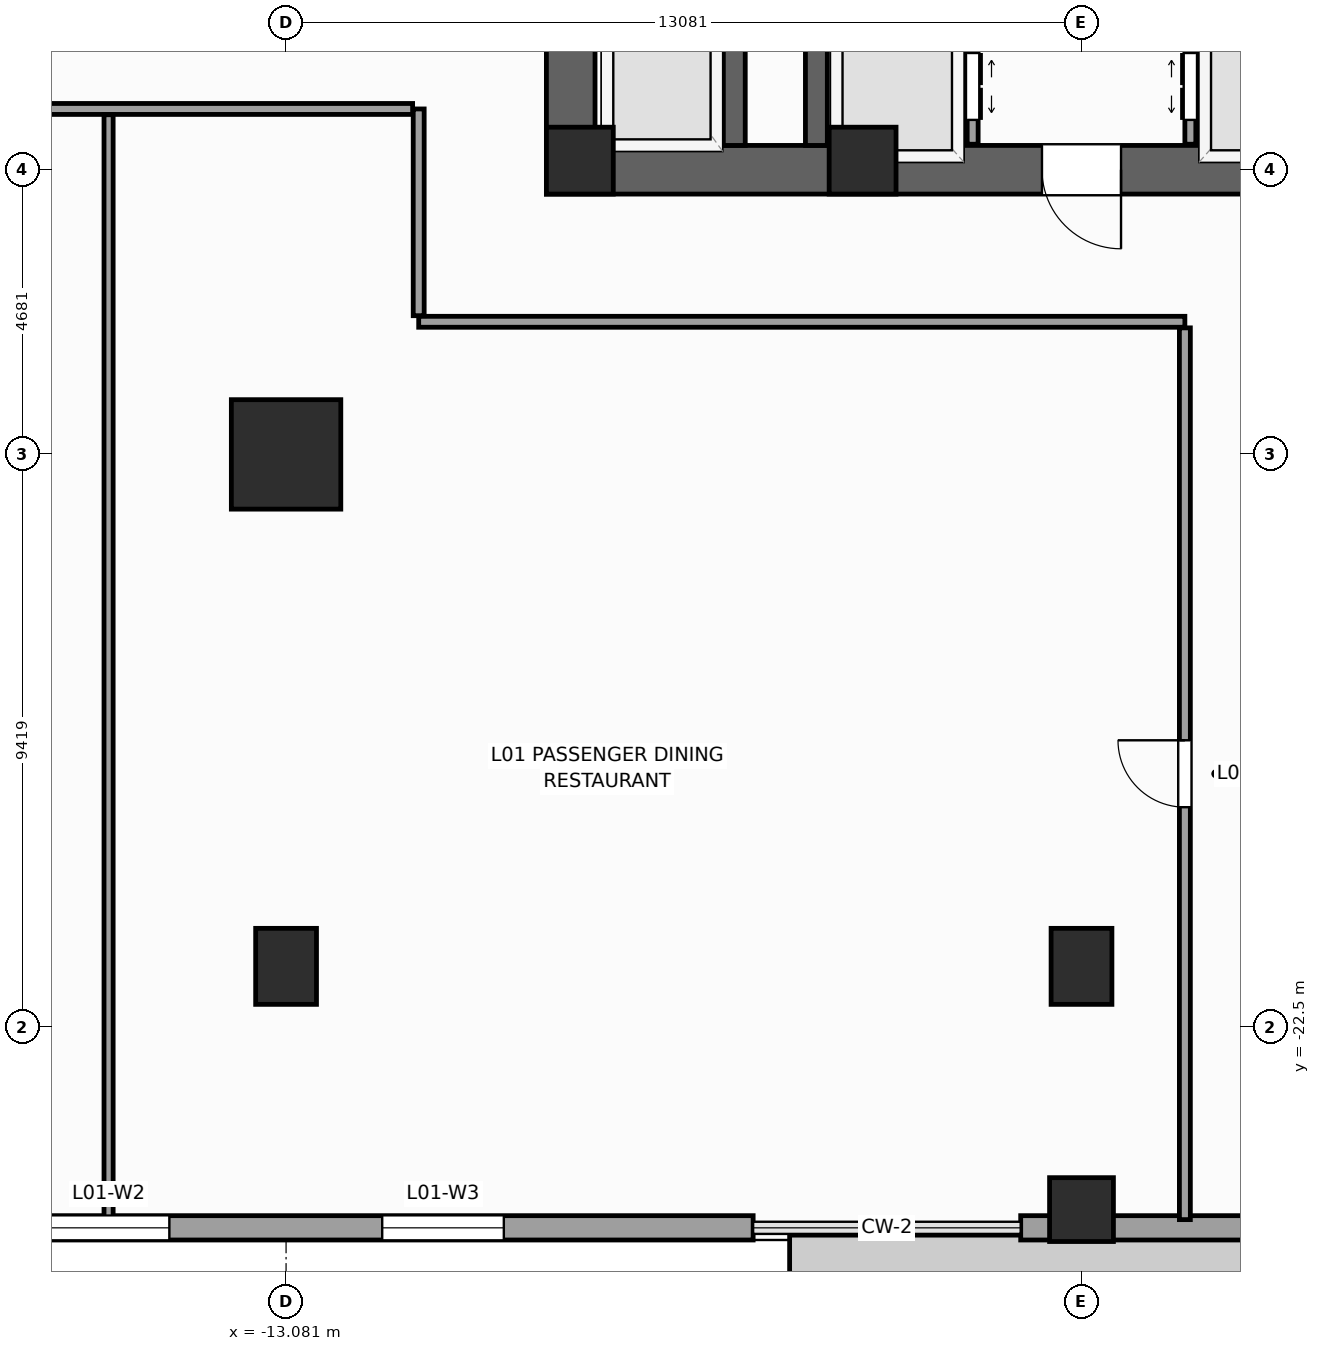
"""IFC4 building model, lengths in metres.
Left out: names, types, materials, properties, quantities, classifications, styles, units other than length and angle.
Written with IfcOpenShell. Run it as: python <this file> out.ifc"""

import sys

from ifc_helpers import new_model, si_unit, direction, frame, frame_2d, origin, origin_2d, place, context, subcontext, project, spatial, rectangle, extrude, source, transform, mapped, element, fill, save


model = new_model("IFC4")
c1 = context("Model", 3, precision=1e-05, world=origin(), true_north=direction((0.0, 1.0)))
c2 = subcontext(c1, "Body", "Model", "MODEL_VIEW")
j1 = project(units=[si_unit("LENGTHUNIT", "METRE"), si_unit("PLANEANGLEUNIT", "RADIAN")], contexts=[c1])
p1 = place(None, origin())
s1 = spatial("IfcSite", under=j1, at=p1, CompositionType="ELEMENT")
p2 = place(p1, origin())
s2 = spatial("IfcBuilding", under=s1, at=p2, CompositionType="ELEMENT")
p3 = place(p2, frame((0.0, 0.0, 6.0)))
s3 = spatial("IfcBuildingStorey", under=s2, at=p3, CompositionType="ELEMENT", Elevation=6.0)
p4 = place(p3, frame((-8.8, -8.4, 0.0), z_axis=(0.0, 0.0, 1.0), x_axis=(1.0, 0.0, 0.0)))
e1 = element("IfcWall", 1, at=p4, inside=s3, PredefinedType="SHEAR", context=c2, shape_type="SweptSolid", body=[
    extrude(rectangle(XDim=17.6, YDim=0.8, at=frame_2d((8.8, 0.0))), origin(), (0.0, 0.0, 1.0), 5.0),
])
p5 = place(p4, frame((8.15, 0.0, 0.0)))
e2 = element("IfcOpeningElement", 2, at=p5, cuts=e1, PredefinedType="OPENING", context=c2, shape_type="SweptSolid", body=[
    extrude(rectangle(XDim=1.3, YDim=2.2, at=frame_2d((0.65, 1.1))), frame((0.0, 0.41, 0.0), z_axis=(0.0, -1.0, 0.0), x_axis=(1.0, 0.0, 0.0)), (0.0, 0.0, 1.0), 0.82),
])
p6 = place(p3, frame((-8.4, -8.0, 0.0), z_axis=(0.0, 0.0, 1.0), x_axis=(0.0, 1.0, 0.0)))
e3 = element("IfcWall", 3, at=p6, inside=s3, PredefinedType="SHEAR", context=c2, shape_type="SweptSolid", body=[
    extrude(rectangle(XDim=16.0, YDim=0.8, at=frame_2d((8.0, 0.0))), origin(), (0.0, 0.0, 1.0), 5.0),
])
p7 = place(p6, frame((4.69, 0.0, 0.0)))
e4 = element("IfcOpeningElement", 4, at=p7, cuts=e3, PredefinedType="OPENING", context=c2, shape_type="SweptSolid", body=[
    extrude(rectangle(XDim=1.3, YDim=2.2, at=frame_2d((0.65, 1.1))), frame((0.0, 0.41, 0.0), z_axis=(0.0, -1.0, 0.0), x_axis=(1.0, 0.0, 0.0)), (0.0, 0.0, 1.0), 0.82),
])
p8 = place(p3, frame((-4.36, -8.0, 0.0), z_axis=(0.0, 0.0, 1.0), x_axis=(0.0, 1.0, 0.0)))
e5 = element("IfcWall", 5, at=p8, inside=s3, PredefinedType="SHEAR", context=c2, shape_type="SweptSolid", body=[
    extrude(rectangle(XDim=16.0, YDim=0.36, at=frame_2d((8.0, 0.0))), origin(), (0.0, 0.0, 1.0), 5.0),
])
p9 = place(p3, frame((-5.71, -8.0, 0.0), z_axis=(0.0, 0.0, 1.0), x_axis=(0.0, 1.0, 0.0)))
e6 = element("IfcWall", 6, at=p9, inside=s3, PredefinedType="SHEAR", context=c2, shape_type="SweptSolid", body=[
    extrude(rectangle(XDim=2.54, YDim=0.36, at=frame_2d((1.27, 0.0))), origin(), (0.0, 0.0, 1.0), 5.0),
])
m1 = source(origin(), c2, "Body", "SweptSolid", [
    extrude(rectangle(XDim=1.1, YDim=1.1, at=origin_2d()), origin(), (0.0, 0.0, 1.0), 5.0),
])
for number, where, z_axis, x_axis in (
    (7, (-8.25, -8.25, 0.0), (0.0, 0.0, 1.0), (1.0, 0.0, 0.0)),
    (8, (-3.6, -8.25, 0.0), (0.0, 0.0, 1.0), (1.0, 0.0, 0.0)),
):
    element("IfcColumn", number, at=place(p3, frame(where, z_axis=z_axis, x_axis=x_axis)), inside=s3, PredefinedType="PILASTER", context=c2, shape_type="MappedRepresentation", body=[
        mapped(m1, transform((0.0, 0.0, 0.0), scale=1.0)),
    ])
m2 = source(origin(), c2, "Body", "SweptSolid", [
    extrude(rectangle(XDim=1.8, YDim=1.8, at=origin_2d()), origin(), (0.0, 0.0, 1.0), 5.0),
])
p10 = place(p3, frame((-13.081, -13.081, 0.0), z_axis=(0.0, 0.0, 1.0), x_axis=(1.0, 0.0, 0.0)))
e9 = element("IfcColumn", 9, at=p10, inside=s3, PredefinedType="COLUMN", context=c2, shape_type="MappedRepresentation", body=[
    mapped(m2, transform((0.0, 0.0, 0.0), scale=1.0)),
])
m3 = source(origin(), c2, "Body", "SweptSolid", [
    extrude(rectangle(XDim=1.0, YDim=1.25, at=origin_2d()), origin(), (0.0, 0.0, 1.0), 5.0),
])
for number, where, z_axis, x_axis in (
    (10, (-13.081, -21.5, 0.0), (0.0, 0.0, 1.0), (1.0, 0.0, 0.0)),
    (11, (0.0, -21.5, 0.0), (0.0, 0.0, 1.0), (1.0, 0.0, 0.0)),
):
    element("IfcColumn", number, at=place(p3, frame(where, z_axis=z_axis, x_axis=x_axis)), inside=s3, PredefinedType="COLUMN", context=c2, shape_type="MappedRepresentation", body=[
        mapped(m3, transform((0.0, 0.0, 0.0), scale=1.0)),
    ])
m4 = source(origin(), c2, "Body", "SweptSolid", [
    extrude(rectangle(XDim=1.05, YDim=1.05, at=origin_2d()), origin(), (0.0, 0.0, 1.0), 5.0),
])
p11 = place(p3, frame((0.0, -25.5, 0.0), z_axis=(0.0, 0.0, 1.0), x_axis=(1.0, 0.0, 0.0)))
e12 = element("IfcColumn", 12, at=p11, inside=s3, PredefinedType="COLUMN", context=c2, shape_type="MappedRepresentation", body=[
    mapped(m4, transform((0.0, 0.0, 0.0), scale=1.0)),
])
p12 = place(p3, frame((-39.0, -25.8, 0.0), z_axis=(0.0, 0.0, 1.0), x_axis=(1.0, 0.0, 0.0)))
e13 = element("IfcWall", 13, at=p12, inside=s3, PredefinedType="STANDARD", context=c2, shape_type="SweptSolid", body=[
    extrude(rectangle(XDim=33.6, YDim=0.4, at=frame_2d((16.8, 0.0))), origin(), (0.0, 0.0, 1.0), 3.85),
])
p13 = place(p12, frame((17.0, 0.0, 0.85)))
e14 = element("IfcOpeningElement", 14, at=p13, cuts=e13, PredefinedType="OPENING", context=c2, shape_type="SweptSolid", body=[
    extrude(rectangle(XDim=2.0, YDim=2.8, at=frame_2d((1.0, 1.4))), frame((0.0, 0.21, 0.0), z_axis=(0.0, -1.0, 0.0), x_axis=(1.0, 0.0, 0.0)), (0.0, 0.0, 1.0), 0.42),
])
p14 = place(p12, frame((22.0, 0.0, 0.85)))
e15 = element("IfcOpeningElement", 15, at=p14, cuts=e13, PredefinedType="OPENING", context=c2, shape_type="SweptSolid", body=[
    extrude(rectangle(XDim=2.0, YDim=2.8, at=frame_2d((1.0, 1.4))), frame((0.0, 0.21, 0.0), z_axis=(0.0, -1.0, 0.0), x_axis=(1.0, 0.0, 0.0)), (0.0, 0.0, 1.0), 0.42),
])
p15 = place(p12, frame((27.5, 0.0, 0.85)))
e16 = element("IfcOpeningElement", 16, at=p15, cuts=e13, PredefinedType="OPENING", context=c2, shape_type="SweptSolid", body=[
    extrude(rectangle(XDim=2.0, YDim=2.8, at=frame_2d((1.0, 1.4))), frame((0.0, 0.21, 0.0), z_axis=(0.0, -1.0, 0.0), x_axis=(1.0, 0.0, 0.0)), (0.0, 0.0, 1.0), 0.42),
])
p16 = place(p3, frame((-1.0, -25.8, 0.0), z_axis=(0.0, 0.0, 1.0), x_axis=(1.0, 0.0, 0.0)))
e17 = element("IfcWall", 17, at=p16, inside=s3, PredefinedType="STANDARD", context=c2, shape_type="SweptSolid", body=[
    extrude(rectangle(XDim=40.0, YDim=0.4, at=frame_2d((20.0, 0.0))), origin(), (0.0, 0.0, 1.0), 3.85),
])
p17 = place(p16, frame((10.5, 0.0, 0.85)))
e18 = element("IfcOpeningElement", 18, at=p17, cuts=e17, PredefinedType="OPENING", context=c2, shape_type="SweptSolid", body=[
    extrude(rectangle(XDim=2.0, YDim=2.8, at=frame_2d((1.0, 1.4))), frame((0.0, 0.21, 0.0), z_axis=(0.0, -1.0, 0.0), x_axis=(1.0, 0.0, 0.0)), (0.0, 0.0, 1.0), 0.42),
])
p18 = place(p16, frame((16.0, 0.0, 0.85)))
e19 = element("IfcOpeningElement", 19, at=p18, cuts=e17, PredefinedType="OPENING", context=c2, shape_type="SweptSolid", body=[
    extrude(rectangle(XDim=2.0, YDim=2.8, at=frame_2d((1.0, 1.4))), frame((0.0, 0.21, 0.0), z_axis=(0.0, -1.0, 0.0), x_axis=(1.0, 0.0, 0.0)), (0.0, 0.0, 1.0), 0.42),
])
p19 = place(p16, frame((21.0, 0.0, 0.85)))
e20 = element("IfcOpeningElement", 20, at=p19, cuts=e17, PredefinedType="OPENING", context=c2, shape_type="SweptSolid", body=[
    extrude(rectangle(XDim=2.0, YDim=2.8, at=frame_2d((1.0, 1.4))), frame((0.0, 0.21, 0.0), z_axis=(0.0, -1.0, 0.0), x_axis=(1.0, 0.0, 0.0)), (0.0, 0.0, 1.0), 0.42),
])
p20 = place(p3, frame((-1.79, -7.98, 0.0), z_axis=(0.0, 0.0, 1.0), x_axis=(0.0, 1.0, 0.0)))
e21 = element("IfcWall", 21, at=p20, inside=s3, PredefinedType="PARTITIONING", context=c2, shape_type="SweptSolid", body=[
    extrude(rectangle(XDim=12.38, YDim=0.18, at=frame_2d((6.19, 0.0))), origin(), (0.0, 0.0, 1.0), 4.66),
])
p21 = place(p20, frame((0.4, 0.0, 0.0)))
e22 = element("IfcOpeningElement", 22, at=p21, cuts=e21, PredefinedType="OPENING", context=c2, shape_type="SweptSolid", body=[
    extrude(rectangle(XDim=1.1, YDim=2.2, at=frame_2d((0.55, 1.1))), frame((0.0, 0.1, 0.0), z_axis=(0.0, -1.0, 0.0), x_axis=(1.0, 0.0, 0.0)), (0.0, 0.0, 1.0), 0.2),
])
p22 = place(p20, frame((2.46, 0.0, 0.0)))
e23 = element("IfcOpeningElement", 23, at=p22, cuts=e21, PredefinedType="OPENING", context=c2, shape_type="SweptSolid", body=[
    extrude(rectangle(XDim=1.1, YDim=2.2, at=frame_2d((0.55, 1.1))), frame((0.0, 0.1, 0.0), z_axis=(0.0, -1.0, 0.0), x_axis=(1.0, 0.0, 0.0)), (0.0, 0.0, 1.0), 0.2),
])
p23 = place(p3, frame((1.79, -7.98, 0.0), z_axis=(0.0, 0.0, 1.0), x_axis=(0.0, 1.0, 0.0)))
e24 = element("IfcWall", 24, at=p23, inside=s3, PredefinedType="PARTITIONING", context=c2, shape_type="SweptSolid", body=[
    extrude(rectangle(XDim=12.38, YDim=0.18, at=frame_2d((6.19, 0.0))), origin(), (0.0, 0.0, 1.0), 4.66),
])
p24 = place(p23, frame((0.4, 0.0, 0.0)))
e25 = element("IfcOpeningElement", 25, at=p24, cuts=e24, PredefinedType="OPENING", context=c2, shape_type="SweptSolid", body=[
    extrude(rectangle(XDim=1.1, YDim=2.2, at=frame_2d((0.55, 1.1))), frame((0.0, 0.1, 0.0), z_axis=(0.0, -1.0, 0.0), x_axis=(1.0, 0.0, 0.0)), (0.0, 0.0, 1.0), 0.2),
])
p25 = place(p23, frame((2.46, 0.0, 0.0)))
e26 = element("IfcOpeningElement", 26, at=p25, cuts=e24, PredefinedType="OPENING", context=c2, shape_type="SweptSolid", body=[
    extrude(rectangle(XDim=1.1, YDim=2.2, at=frame_2d((0.55, 1.1))), frame((0.0, 0.1, 0.0), z_axis=(0.0, -1.0, 0.0), x_axis=(1.0, 0.0, 0.0)), (0.0, 0.0, 1.0), 0.2),
])
p26 = place(p3, frame((-10.9, -10.9, 0.0), z_axis=(0.0, 0.0, 1.0), x_axis=(1.0, 0.0, 0.0)))
e27 = element("IfcWall", 27, at=p26, inside=s3, PredefinedType="PARTITIONING", context=c2, shape_type="SweptSolid", body=[
    extrude(rectangle(XDim=12.6, YDim=0.18, at=frame_2d((6.3, 0.0))), origin(), (0.0, 0.0, 1.0), 4.66),
])
p27 = place(p3, frame((-10.9, -10.8, 0.0), z_axis=(0.0, 0.0, 1.0), x_axis=(0.0, 1.0, 0.0)))
e28 = element("IfcWall", 28, at=p27, inside=s3, PredefinedType="PARTITIONING", context=c2, shape_type="SweptSolid", body=[
    extrude(rectangle(XDim=3.4, YDim=0.18, at=frame_2d((1.7, 0.0))), origin(), (0.0, 0.0, 1.0), 4.66),
])
p28 = place(p3, frame((-38.665, -7.4, 0.0), z_axis=(0.0, 0.0, 1.0), x_axis=(1.0, 0.0, 0.0)))
e29 = element("IfcWall", 29, at=p28, inside=s3, PredefinedType="PARTITIONING", context=c2, shape_type="SweptSolid", body=[
    extrude(rectangle(XDim=27.665, YDim=0.18, at=frame_2d((13.833, 0.0))), origin(), (0.0, 0.0, 1.0), 4.66),
])
p29 = place(p28, frame((1.455, 0.0, 0.0)))
e30 = element("IfcOpeningElement", 30, at=p29, cuts=e29, PredefinedType="OPENING", context=c2, shape_type="SweptSolid", body=[
    extrude(rectangle(XDim=0.95, YDim=2.1, at=frame_2d((0.475, 1.05))), frame((0.0, 0.1, 0.0), z_axis=(0.0, -1.0, 0.0), x_axis=(1.0, 0.0, 0.0)), (0.0, 0.0, 1.0), 0.2),
])
p30 = place(p28, frame((12.241, 0.0, 0.0)))
e31 = element("IfcOpeningElement", 31, at=p30, cuts=e29, PredefinedType="OPENING", context=c2, shape_type="SweptSolid", body=[
    extrude(rectangle(XDim=1.1, YDim=2.2, at=frame_2d((0.55, 1.1))), frame((0.0, 0.1, 0.0), z_axis=(0.0, -1.0, 0.0), x_axis=(1.0, 0.0, 0.0)), (0.0, 0.0, 1.0), 0.2),
])
p31 = place(p3, frame((1.7, -25.665, 0.0), z_axis=(0.0, 0.0, 1.0), x_axis=(0.0, 1.0, 0.0)))
e32 = element("IfcWall", 32, at=p31, inside=s3, PredefinedType="PARTITIONING", context=c2, shape_type="SweptSolid", body=[
    extrude(rectangle(XDim=14.665, YDim=0.18, at=frame_2d((7.333, 0.0))), origin(), (0.0, 0.0, 1.0), 4.66),
])
p32 = place(p31, frame((6.782, 0.0, 0.0)))
e33 = element("IfcOpeningElement", 33, at=p32, cuts=e32, PredefinedType="OPENING", context=c2, shape_type="SweptSolid", body=[
    extrude(rectangle(XDim=1.1, YDim=2.2, at=frame_2d((0.55, 1.1))), frame((0.0, 0.1, 0.0), z_axis=(0.0, -1.0, 0.0), x_axis=(1.0, 0.0, 0.0)), (0.0, 0.0, 1.0), 0.2),
])
p33 = place(p3, frame((-16.0, -25.665, 0.0), z_axis=(0.0, 0.0, 1.0), x_axis=(0.0, 1.0, 0.0)))
e34 = element("IfcWall", 34, at=p33, inside=s3, PredefinedType="PARTITIONING", context=c2, shape_type="SweptSolid", body=[
    extrude(rectangle(XDim=18.17, YDim=0.15, at=frame_2d((9.085, 0.0))), origin(), (0.0, 0.0, 1.0), 4.66),
])
m5 = source(origin(), c2, "Body", "SweptSolid", [
    extrude(rectangle(XDim=2.0, YDim=2.8, at=frame_2d((1.0, 1.4))), frame((0.0, 0.03, 0.0), z_axis=(0.0, -1.0, 0.0), x_axis=(1.0, 0.0, 0.0)), (0.0, 0.0, 1.0), 0.06),
])
p34 = place(p14, origin())
e35 = element("IfcWindow", 35, at=p34, inside=s3, PartitioningType="SINGLE_PANEL", PredefinedType="WINDOW", context=c2, shape_type="MappedRepresentation", body=[
    mapped(m5, transform((0.0, 0.0, 0.0), scale=1.0)),
])
fill(e15, e35)
p35 = place(p15, origin())
e36 = element("IfcWindow", 36, at=p35, inside=s3, PartitioningType="SINGLE_PANEL", PredefinedType="WINDOW", context=c2, shape_type="MappedRepresentation", body=[
    mapped(m5, transform((0.0, 0.0, 0.0), scale=1.0)),
])
fill(e16, e36)
m6 = source(origin(), c2, "Body", "SweptSolid", [
    extrude(rectangle(XDim=1.3, YDim=2.2, at=frame_2d((0.65, 1.1))), frame((0.0, 0.025, 0.0), z_axis=(0.0, -1.0, 0.0), x_axis=(1.0, 0.0, 0.0)), (0.0, 0.0, 1.0), 0.05),
])
p36 = place(p5, frame((1.3, 0.0, 0.0), z_axis=(0.0, 0.0, 1.0), x_axis=(-1.0, 0.0, 0.0)))
e37 = element("IfcDoor", 37, at=p36, inside=s3, OperationType="SINGLE_SWING_RIGHT", PredefinedType="DOOR", context=c2, shape_type="MappedRepresentation", body=[
    mapped(m6, transform((0.0, 0.0, 0.0), scale=1.0)),
])
fill(e2, e37)
m7 = source(origin(), c2, "Body", "SweptSolid", [
    extrude(rectangle(XDim=1.1, YDim=2.2, at=frame_2d((0.55, 1.1))), frame((0.0, 0.025, 0.0), z_axis=(0.0, -1.0, 0.0), x_axis=(1.0, 0.0, 0.0)), (0.0, 0.0, 1.0), 0.05),
])
p37 = place(p21, frame((1.1, 0.0, 0.0), z_axis=(0.0, 0.0, 1.0), x_axis=(-1.0, 0.0, 0.0)))
e38 = element("IfcDoor", 38, at=p37, inside=s3, OperationType="DOUBLE_DOOR_SLIDING", PredefinedType="DOOR", context=c2, shape_type="MappedRepresentation", body=[
    mapped(m7, transform((0.0, 0.0, 0.0), scale=1.0)),
])
fill(e22, e38)
p38 = place(p24, origin())
e39 = element("IfcDoor", 39, at=p38, inside=s3, OperationType="DOUBLE_DOOR_SLIDING", PredefinedType="DOOR", context=c2, shape_type="MappedRepresentation", body=[
    mapped(m7, transform((0.0, 0.0, 0.0), scale=1.0)),
])
fill(e25, e39)
p39 = place(p32, origin())
e40 = element("IfcDoor", 40, at=p39, inside=s3, OperationType="SINGLE_SWING_RIGHT", PredefinedType="DOOR", context=c2, shape_type="MappedRepresentation", body=[
    mapped(m7, transform((0.0, 0.0, 0.0), scale=1.0)),
])
fill(e33, e40)
save(model, sys.argv[1])
